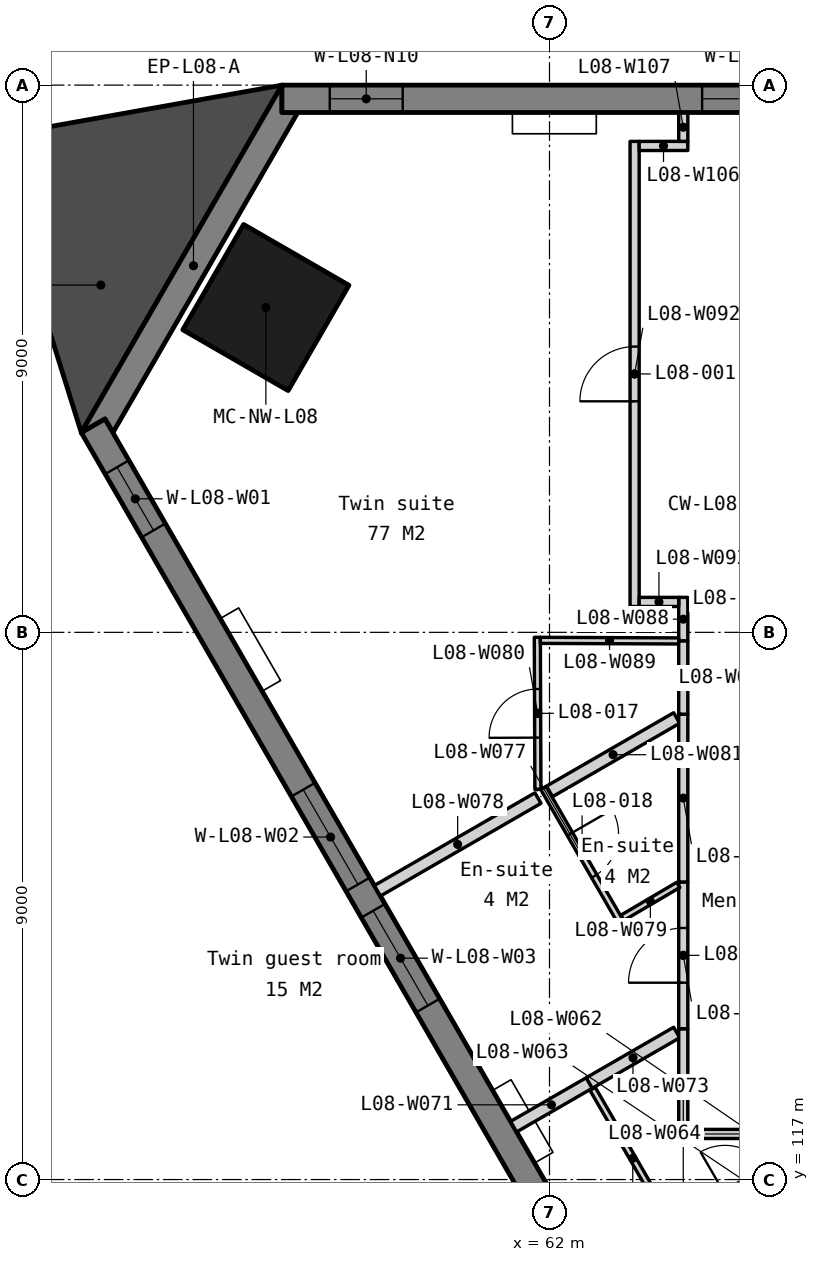
"""IFC4 building model, lengths in metres.
Left out: names, types, materials, properties, quantities, classifications, styles, units other than length and angle.
Written with IfcOpenShell. Run it as: python <this file> out.ifc"""

import sys

from ifc_helpers import new_model, si_unit, direction, frame, frame_2d, origin, origin_2d, place, context, subcontext, project, spatial, polyline, rectangle, outline, extrude, element, fill, save


model = new_model("IFC4")
c1 = context("Model", 3, precision=1e-05, world=origin(), true_north=direction((0.0, 1.0)))
c2 = subcontext(c1, "Body", "Model", "MODEL_VIEW")
j1 = project(units=[si_unit("LENGTHUNIT", "METRE"), si_unit("PLANEANGLEUNIT", "RADIAN")], contexts=[c1])
p1 = place(None, origin())
s1 = spatial("IfcSite", under=j1, at=p1, CompositionType="ELEMENT")
p2 = place(p1, origin())
s2 = spatial("IfcBuilding", under=s1, at=p2, CompositionType="ELEMENT")
p3 = place(p2, frame((0.0, 0.0, 42.0)))
s3 = spatial("IfcBuildingStorey", under=s2, at=p3, CompositionType="ELEMENT", Elevation=42.0)
p4 = place(p3, frame((57.336, 131.342, 0.0), z_axis=(0.0, 0.0, 1.0), x_axis=(-0.5, -0.866025403784, 0.0)))
e1 = element("IfcColumn", 1, at=p4, inside=s3, PredefinedType="COLUMN", context=c2, shape_type="SweptSolid", body=[
    extrude(rectangle(XDim=2.0, YDim=2.0, at=origin_2d()), origin(), (0.0, 0.0, 1.0), 3.5),
])
p5 = place(p3, frame((0.0, 0.0, -0.15)))
e2 = element("IfcWall", 2, at=p5, inside=s3, PredefinedType="SOLIDWALL", context=c2, shape_type="SweptSolid", body=[
    extrude(outline(polyline([(57.6, 135.0), (57.6, 134.55), (57.86, 134.55), (54.82, 129.284), (54.69, 129.509), (54.3, 129.284), (57.6, 135.0)])), origin(), (0.0, 0.0, 1.0), 3.5),
])
p6 = place(p3, frame((102.4, 134.775, -0.15), z_axis=(0.0, 0.0, 1.0), x_axis=(-1.0, 0.0, 0.0)))
e3 = element("IfcWall", 3, at=p6, inside=s3, PredefinedType="SOLIDWALL", context=c2, shape_type="SweptSolid", body=[
    extrude(outline(polyline([(44.8, 0.0), (44.8, 3.5), (0.0, 3.5), (0.0, 0.0), (44.8, 0.0)])), frame((0.0, 0.225, 0.0), z_axis=(0.0, -1.0, 0.0), x_axis=(1.0, 0.0, 0.0)), (0.0, 0.0, 1.0), 0.45),
])
p7 = place(p6, frame((0.786, 0.0, 1.05)))
e4 = element("IfcOpeningElement", 4, at=p7, cuts=e3, PredefinedType="OPENING", context=c2, shape_type="SweptSolid", body=[
    extrude(rectangle(XDim=1.2, YDim=1.5, at=frame_2d((0.6, 0.75))), frame((0.0, 0.235, 0.0), z_axis=(0.0, -1.0, 0.0), x_axis=(1.0, 0.0, 0.0)), (0.0, 0.0, 1.0), 0.47),
])
p8 = place(p6, frame((6.91, 0.0, 1.05)))
e5 = element("IfcOpeningElement", 5, at=p8, cuts=e3, PredefinedType="OPENING", context=c2, shape_type="SweptSolid", body=[
    extrude(rectangle(XDim=1.8, YDim=1.5, at=frame_2d((0.9, 0.75))), frame((0.0, 0.235, 0.0), z_axis=(0.0, -1.0, 0.0), x_axis=(1.0, 0.0, 0.0)), (0.0, 0.0, 1.0), 0.47),
])
p9 = place(p6, frame((9.21, 0.0, 1.05)))
e6 = element("IfcOpeningElement", 6, at=p9, cuts=e3, PredefinedType="OPENING", context=c2, shape_type="SweptSolid", body=[
    extrude(rectangle(XDim=1.8, YDim=1.5, at=frame_2d((0.9, 0.75))), frame((0.0, 0.235, 0.0), z_axis=(0.0, -1.0, 0.0), x_axis=(1.0, 0.0, 0.0)), (0.0, 0.0, 1.0), 0.47),
])
p10 = place(p6, frame((15.87, 0.0, 1.05)))
e7 = element("IfcOpeningElement", 7, at=p10, cuts=e3, PredefinedType="OPENING", context=c2, shape_type="SweptSolid", body=[
    extrude(rectangle(XDim=1.8, YDim=1.5, at=frame_2d((0.9, 0.75))), frame((0.0, 0.235, 0.0), z_axis=(0.0, -1.0, 0.0), x_axis=(1.0, 0.0, 0.0)), (0.0, 0.0, 1.0), 0.47),
])
p11 = place(p6, frame((18.17, 0.0, 1.05)))
e8 = element("IfcOpeningElement", 8, at=p11, cuts=e3, PredefinedType="OPENING", context=c2, shape_type="SweptSolid", body=[
    extrude(rectangle(XDim=1.8, YDim=1.5, at=frame_2d((0.9, 0.75))), frame((0.0, 0.235, 0.0), z_axis=(0.0, -1.0, 0.0), x_axis=(1.0, 0.0, 0.0)), (0.0, 0.0, 1.0), 0.47),
])
p12 = place(p6, frame((24.83, 0.0, 1.05)))
e9 = element("IfcOpeningElement", 9, at=p12, cuts=e3, PredefinedType="OPENING", context=c2, shape_type="SweptSolid", body=[
    extrude(rectangle(XDim=1.8, YDim=1.5, at=frame_2d((0.9, 0.75))), frame((0.0, 0.235, 0.0), z_axis=(0.0, -1.0, 0.0), x_axis=(1.0, 0.0, 0.0)), (0.0, 0.0, 1.0), 0.47),
])
p13 = place(p6, frame((27.13, 0.0, 1.05)))
e10 = element("IfcOpeningElement", 10, at=p13, cuts=e3, PredefinedType="OPENING", context=c2, shape_type="SweptSolid", body=[
    extrude(rectangle(XDim=1.8, YDim=1.5, at=frame_2d((0.9, 0.75))), frame((0.0, 0.235, 0.0), z_axis=(0.0, -1.0, 0.0), x_axis=(1.0, 0.0, 0.0)), (0.0, 0.0, 1.0), 0.47),
])
p14 = place(p6, frame((33.79, 0.0, 1.05)))
e11 = element("IfcOpeningElement", 11, at=p14, cuts=e3, PredefinedType="OPENING", context=c2, shape_type="SweptSolid", body=[
    extrude(rectangle(XDim=1.8, YDim=1.5, at=frame_2d((0.9, 0.75))), frame((0.0, 0.235, 0.0), z_axis=(0.0, -1.0, 0.0), x_axis=(1.0, 0.0, 0.0)), (0.0, 0.0, 1.0), 0.47),
])
p15 = place(p6, frame((36.09, 0.0, 1.05)))
e12 = element("IfcOpeningElement", 12, at=p15, cuts=e3, PredefinedType="OPENING", context=c2, shape_type="SweptSolid", body=[
    extrude(rectangle(XDim=1.8, YDim=1.5, at=frame_2d((0.9, 0.75))), frame((0.0, 0.235, 0.0), z_axis=(0.0, -1.0, 0.0), x_axis=(1.0, 0.0, 0.0)), (0.0, 0.0, 1.0), 0.47),
])
p16 = place(p6, frame((42.814, 0.0, 1.05)))
e13 = element("IfcOpeningElement", 13, at=p16, cuts=e3, PredefinedType="OPENING", context=c2, shape_type="SweptSolid", body=[
    extrude(rectangle(XDim=1.2, YDim=1.5, at=frame_2d((0.6, 0.75))), frame((0.0, 0.235, 0.0), z_axis=(0.0, -1.0, 0.0), x_axis=(1.0, 0.0, 0.0)), (0.0, 0.0, 1.0), 0.47),
])
p17 = place(p3, frame((54.495, 129.397, -0.15), z_axis=(0.0, 0.0, 1.0), x_axis=(0.499999201451, -0.866025864826, 0.0)))
e14 = element("IfcWall", 14, at=p17, inside=s3, PredefinedType="SOLIDWALL", context=c2, shape_type="SweptSolid", body=[
    extrude(outline(polyline([(44.8, 0.0), (44.8, 3.5), (0.0, 3.5), (0.0, 0.0), (44.8, 0.0)])), frame((0.0, 0.225, 0.0), z_axis=(0.0, -1.0, 0.0), x_axis=(1.0, 0.0, 0.0)), (0.0, 0.0, 1.0), 0.45),
])
p18 = place(p17, frame((0.786, 0.0, 1.05)))
e15 = element("IfcOpeningElement", 15, at=p18, cuts=e14, PredefinedType="OPENING", context=c2, shape_type="SweptSolid", body=[
    extrude(rectangle(XDim=1.2, YDim=1.5, at=frame_2d((0.6, 0.75))), frame((0.0, 0.235, 0.0), z_axis=(0.0, -1.0, 0.0), x_axis=(1.0, 0.0, 0.0)), (0.0, 0.0, 1.0), 0.47),
])
p19 = place(p17, frame((6.91, 0.0, 1.05)))
e16 = element("IfcOpeningElement", 16, at=p19, cuts=e14, PredefinedType="OPENING", context=c2, shape_type="SweptSolid", body=[
    extrude(rectangle(XDim=1.8, YDim=1.5, at=frame_2d((0.9, 0.75))), frame((0.0, 0.235, 0.0), z_axis=(0.0, -1.0, 0.0), x_axis=(1.0, 0.0, 0.0)), (0.0, 0.0, 1.0), 0.47),
])
p20 = place(p17, frame((9.21, 0.0, 1.05)))
e17 = element("IfcOpeningElement", 17, at=p20, cuts=e14, PredefinedType="OPENING", context=c2, shape_type="SweptSolid", body=[
    extrude(rectangle(XDim=1.8, YDim=1.5, at=frame_2d((0.9, 0.75))), frame((0.0, 0.235, 0.0), z_axis=(0.0, -1.0, 0.0), x_axis=(1.0, 0.0, 0.0)), (0.0, 0.0, 1.0), 0.47),
])
p21 = place(p17, frame((15.87, 0.0, 1.05)))
e18 = element("IfcOpeningElement", 18, at=p21, cuts=e14, PredefinedType="OPENING", context=c2, shape_type="SweptSolid", body=[
    extrude(rectangle(XDim=1.8, YDim=1.5, at=frame_2d((0.9, 0.75))), frame((0.0, 0.235, 0.0), z_axis=(0.0, -1.0, 0.0), x_axis=(1.0, 0.0, 0.0)), (0.0, 0.0, 1.0), 0.47),
])
p22 = place(p17, frame((18.17, 0.0, 1.05)))
e19 = element("IfcOpeningElement", 19, at=p22, cuts=e14, PredefinedType="OPENING", context=c2, shape_type="SweptSolid", body=[
    extrude(rectangle(XDim=1.8, YDim=1.5, at=frame_2d((0.9, 0.75))), frame((0.0, 0.235, 0.0), z_axis=(0.0, -1.0, 0.0), x_axis=(1.0, 0.0, 0.0)), (0.0, 0.0, 1.0), 0.47),
])
p23 = place(p17, frame((24.83, 0.0, 1.05)))
e20 = element("IfcOpeningElement", 20, at=p23, cuts=e14, PredefinedType="OPENING", context=c2, shape_type="SweptSolid", body=[
    extrude(rectangle(XDim=1.8, YDim=1.5, at=frame_2d((0.9, 0.75))), frame((0.0, 0.235, 0.0), z_axis=(0.0, -1.0, 0.0), x_axis=(1.0, 0.0, 0.0)), (0.0, 0.0, 1.0), 0.47),
])
p24 = place(p17, frame((27.13, 0.0, 1.05)))
e21 = element("IfcOpeningElement", 21, at=p24, cuts=e14, PredefinedType="OPENING", context=c2, shape_type="SweptSolid", body=[
    extrude(rectangle(XDim=1.8, YDim=1.5, at=frame_2d((0.9, 0.75))), frame((0.0, 0.235, 0.0), z_axis=(0.0, -1.0, 0.0), x_axis=(1.0, 0.0, 0.0)), (0.0, 0.0, 1.0), 0.47),
])
p25 = place(p17, frame((33.79, 0.0, 1.05)))
e22 = element("IfcOpeningElement", 22, at=p25, cuts=e14, PredefinedType="OPENING", context=c2, shape_type="SweptSolid", body=[
    extrude(rectangle(XDim=1.8, YDim=1.5, at=frame_2d((0.9, 0.75))), frame((0.0, 0.235, 0.0), z_axis=(0.0, -1.0, 0.0), x_axis=(1.0, 0.0, 0.0)), (0.0, 0.0, 1.0), 0.47),
])
p26 = place(p17, frame((36.09, 0.0, 1.05)))
e23 = element("IfcOpeningElement", 23, at=p26, cuts=e14, PredefinedType="OPENING", context=c2, shape_type="SweptSolid", body=[
    extrude(rectangle(XDim=1.8, YDim=1.5, at=frame_2d((0.9, 0.75))), frame((0.0, 0.235, 0.0), z_axis=(0.0, -1.0, 0.0), x_axis=(1.0, 0.0, 0.0)), (0.0, 0.0, 1.0), 0.47),
])
p27 = place(p17, frame((42.814, 0.0, 1.05)))
e24 = element("IfcOpeningElement", 24, at=p27, cuts=e14, PredefinedType="OPENING", context=c2, shape_type="SweptSolid", body=[
    extrude(rectangle(XDim=1.2, YDim=1.5, at=frame_2d((0.6, 0.75))), frame((0.0, 0.235, 0.0), z_axis=(0.0, -1.0, 0.0), x_axis=(1.0, 0.0, 0.0)), (0.0, 0.0, 1.0), 0.47),
])
p28 = place(p3, frame((0.0, 0.0, -0.15)))
e25 = element("IfcWall", 25, at=p28, inside=s3, PredefinedType="SOLIDWALL", context=c2, shape_type="SweptSolid", body=[
    extrude(outline(polyline([(57.6, 135.0), (52.782, 134.139), (54.3, 129.284), (57.6, 135.0)])), origin(), (0.0, 0.0, 1.0), 3.5),
])
p29 = place(p3, frame((62.709, 118.493, 0.0), z_axis=(0.0, 0.0, 1.0), x_axis=(0.500048002682, -0.865997687649, 0.0)))
e26 = element("IfcWall", 26, at=p29, inside=s3, PredefinedType="PARTITIONING", context=c2, shape_type="SweptSolid", body=[
    extrude(rectangle(XDim=2.64, YDim=0.1, at=frame_2d((1.32, 0.0))), origin(), (0.0, 0.0, 1.0), 3.35),
])
p30 = place(p3, frame((64.125, 117.75, 0.0), z_axis=(0.0, 0.0, 1.0), x_axis=(1.0, 0.0, 0.0)))
e27 = element("IfcWall", 27, at=p30, inside=s3, PredefinedType="PARTITIONING", context=c2, shape_type="SweptSolid", body=[
    extrude(rectangle(XDim=2.457, YDim=0.15, at=frame_2d((1.229, 0.0))), origin(), (0.0, 0.0, 1.0), 3.35),
])
p31 = place(p3, frame((64.056, 116.28, 0.0), z_axis=(0.0, 0.0, 1.0), x_axis=(0.864358276906, 0.50287649492, 0.0)))
e28 = element("IfcWall", 28, at=p31, inside=s3, PredefinedType="PARTITIONING", context=c2, shape_type="SweptSolid", body=[
    extrude(rectangle(XDim=2.718, YDim=0.1, at=frame_2d((1.359, 0.0))), origin(), (0.0, 0.0, 1.0), 3.35),
])
p32 = place(p31, frame((0.959, 0.0, 0.0)))
e29 = element("IfcOpeningElement", 29, at=p32, cuts=e28, PredefinedType="OPENING", context=c2, shape_type="SweptSolid", body=[
    extrude(rectangle(XDim=0.8, YDim=2.1, at=frame_2d((0.4, 1.05))), frame((0.0, 0.06, 0.0), z_axis=(0.0, -1.0, 0.0), x_axis=(1.0, 0.0, 0.0)), (0.0, 0.0, 1.0), 0.12),
])
p33 = place(p3, frame((61.41, 117.87, 0.0), z_axis=(0.0, 0.0, 1.0), x_axis=(0.866007328409, 0.500031306162, 0.0)))
e30 = element("IfcWall", 30, at=p33, inside=s3, PredefinedType="PARTITIONING", context=c2, shape_type="SweptSolid", body=[
    extrude(rectangle(XDim=1.437, YDim=0.2, at=frame_2d((0.719, 0.0))), origin(), (0.0, 0.0, 1.0), 3.35),
])
p34 = place(p3, frame((62.654, 118.588, 0.0), z_axis=(0.0, 0.0, 1.0), x_axis=(0.866090081402, 0.499887958344, 0.0)))
e31 = element("IfcWall", 31, at=p34, inside=s3, PredefinedType="PARTITIONING", context=c2, shape_type="SweptSolid", body=[
    extrude(rectangle(XDim=1.66, YDim=0.2, at=frame_2d((0.83, 0.0))), origin(), (0.0, 0.0, 1.0), 3.35),
])
p35 = place(p3, frame((64.2, 117.825, 0.0), z_axis=(0.0, 0.0, 1.0), x_axis=(0.0, 1.0, 0.0)))
e32 = element("IfcWall", 32, at=p35, inside=s3, PredefinedType="PARTITIONING", context=c2, shape_type="SweptSolid", body=[
    extrude(rectangle(XDim=1.656, YDim=0.15, at=frame_2d((0.828, 0.0))), origin(), (0.0, 0.0, 1.0), 3.35),
])
p36 = place(p3, frame((64.2, 119.481, 0.0), z_axis=(0.0, 0.0, 1.0), x_axis=(0.0, 1.0, 0.0)))
e33 = element("IfcWall", 33, at=p36, inside=s3, PredefinedType="PARTITIONING", context=c2, shape_type="SweptSolid", body=[
    extrude(rectangle(XDim=2.413, YDim=0.15, at=frame_2d((1.207, 0.0))), origin(), (0.0, 0.0, 1.0), 3.35),
])
p37 = place(p36, frame((0.757, 0.0, 0.0)))
e34 = element("IfcOpeningElement", 34, at=p37, cuts=e33, PredefinedType="OPENING", context=c2, shape_type="SweptSolid", body=[
    extrude(rectangle(XDim=0.9, YDim=2.1, at=frame_2d((0.45, 1.05))), frame((0.0, 0.085, 0.0), z_axis=(0.0, -1.0, 0.0), x_axis=(1.0, 0.0, 0.0)), (0.0, 0.0, 1.0), 0.17),
])
p38 = place(p3, frame((61.898, 123.44, 0.0), z_axis=(0.0, 0.0, 1.0), x_axis=(0.499990435942, -0.866030925526, 0.0)))
e35 = element("IfcWall", 35, at=p38, inside=s3, PredefinedType="PARTITIONING", context=c2, shape_type="SweptSolid", body=[
    extrude(rectangle(XDim=2.55, YDim=0.1, at=frame_2d((1.275, 0.0))), origin(), (0.0, 0.0, 1.0), 3.35),
])
p39 = place(p38, frame((0.875, 0.0, 0.0)))
e36 = element("IfcOpeningElement", 36, at=p39, cuts=e35, PredefinedType="OPENING", context=c2, shape_type="SweptSolid", body=[
    extrude(rectangle(XDim=0.8, YDim=2.1, at=frame_2d((0.4, 1.05))), frame((0.0, 0.06, 0.0), z_axis=(0.0, -1.0, 0.0), x_axis=(1.0, 0.0, 0.0)), (0.0, 0.0, 1.0), 0.12),
])
p40 = place(p3, frame((59.17, 121.75, 0.0), z_axis=(0.0, 0.0, 1.0), x_axis=(0.86606157367, 0.499937346687, 0.0)))
e37 = element("IfcWall", 37, at=p40, inside=s3, PredefinedType="PARTITIONING", context=c2, shape_type="SweptSolid", body=[
    extrude(rectangle(XDim=3.049, YDim=0.2, at=frame_2d((1.524, 0.0))), origin(), (0.0, 0.0, 1.0), 3.35),
])
p41 = place(p3, frame((63.2, 121.306, 0.0), z_axis=(0.0, 0.0, 1.0), x_axis=(0.86196956313, 0.506960030216, 0.0)))
e38 = element("IfcWall", 38, at=p41, inside=s3, PredefinedType="PARTITIONING", context=c2, shape_type="SweptSolid", body=[
    extrude(rectangle(XDim=1.065, YDim=0.1, at=frame_2d((0.533, 0.0))), origin(), (0.0, 0.0, 1.0), 3.35),
])
p42 = place(p3, frame((61.809, 123.418, 0.0), z_axis=(0.0, 0.0, 1.0), x_axis=(-0.003807822423, 0.999992750218, 0.0)))
e39 = element("IfcWall", 39, at=p42, inside=s3, PredefinedType="PARTITIONING", context=c2, shape_type="SweptSolid", body=[
    extrude(rectangle(XDim=2.5, YDim=0.1, at=frame_2d((1.25, 0.0))), origin(), (0.0, 0.0, 1.0), 3.35),
])
p43 = place(p42, frame((0.85, 0.0, 0.0)))
e40 = element("IfcOpeningElement", 40, at=p43, cuts=e39, PredefinedType="OPENING", context=c2, shape_type="SweptSolid", body=[
    extrude(rectangle(XDim=0.8, YDim=2.1, at=frame_2d((0.4, 1.05))), frame((0.0, 0.06, 0.0), z_axis=(0.0, -1.0, 0.0), x_axis=(1.0, 0.0, 0.0)), (0.0, 0.0, 1.0), 0.12),
])
p44 = place(p3, frame((62.0, 123.384, 0.0), z_axis=(0.0, 0.0, 1.0), x_axis=(0.866032396701, 0.499987887718, 0.0)))
e41 = element("IfcWall", 41, at=p44, inside=s3, PredefinedType="PARTITIONING", context=c2, shape_type="SweptSolid", body=[
    extrude(rectangle(XDim=2.415, YDim=0.2, at=frame_2d((1.208, 0.0))), origin(), (0.0, 0.0, 1.0), 3.35),
])
p45 = place(p3, frame((64.2, 121.894, 0.0), z_axis=(0.0, 0.0, 1.0), x_axis=(0.0, 1.0, 0.0)))
e42 = element("IfcWall", 42, at=p45, inside=s3, PredefinedType="PARTITIONING", context=c2, shape_type="SweptSolid", body=[
    extrude(rectangle(XDim=2.76, YDim=0.15, at=frame_2d((1.38, 0.0))), origin(), (0.0, 0.0, 1.0), 3.35),
])
p46 = place(p3, frame((64.2, 125.858, 0.0), z_axis=(0.0, 0.0, 1.0), x_axis=(0.0, 1.0, 0.0)))
e43 = element("IfcWall", 43, at=p46, inside=s3, PredefinedType="PARTITIONING", context=c2, shape_type="SweptSolid", body=[
    extrude(rectangle(XDim=0.717, YDim=0.15, at=frame_2d((0.358, 0.0))), origin(), (0.0, 0.0, 1.0), 3.35),
])
p47 = place(p3, frame((61.85, 125.868, 0.0), z_axis=(0.0, 0.0, 1.0), x_axis=(0.999991684538, -0.004078094442, 0.0)))
e44 = element("IfcWall", 44, at=p47, inside=s3, PredefinedType="PARTITIONING", context=c2, shape_type="SweptSolid", body=[
    extrude(rectangle(XDim=2.275, YDim=0.1, at=frame_2d((1.137, 0.0))), origin(), (0.0, 0.0, 1.0), 3.35),
])
p48 = place(p3, frame((64.2, 124.654, 0.0), z_axis=(0.0, 0.0, 1.0), x_axis=(0.0, 1.0, 0.0)))
e45 = element("IfcWall", 45, at=p48, inside=s3, PredefinedType="PARTITIONING", context=c2, shape_type="SweptSolid", body=[
    extrude(rectangle(XDim=1.204, YDim=0.15, at=frame_2d((0.602, 0.0))), origin(), (0.0, 0.0, 1.0), 3.35),
])
p49 = place(p3, frame((63.4, 126.425, 0.0), z_axis=(0.0, 0.0, 1.0), x_axis=(0.0, 1.0, 0.0)))
e46 = element("IfcWall", 46, at=p49, inside=s3, PredefinedType="PARTITIONING", context=c2, shape_type="SweptSolid", body=[
    extrude(rectangle(XDim=7.649, YDim=0.15, at=frame_2d((3.825, 0.0))), origin(), (0.0, 0.0, 1.0), 3.35),
])
p50 = place(p49, frame((3.375, 0.0, 0.0)))
e47 = element("IfcOpeningElement", 47, at=p50, cuts=e46, PredefinedType="OPENING", context=c2, shape_type="SweptSolid", body=[
    extrude(rectangle(XDim=0.9, YDim=2.1, at=frame_2d((0.45, 1.05))), frame((0.0, 0.085, 0.0), z_axis=(0.0, -1.0, 0.0), x_axis=(1.0, 0.0, 0.0)), (0.0, 0.0, 1.0), 0.17),
])
p51 = place(p3, frame((63.475, 126.5, 0.0), z_axis=(0.0, 0.0, 1.0), x_axis=(1.0, 0.0, 0.0)))
e48 = element("IfcWall", 48, at=p51, inside=s3, PredefinedType="PARTITIONING", context=c2, shape_type="SweptSolid", body=[
    extrude(rectangle(XDim=0.65, YDim=0.15, at=frame_2d((0.325, 0.0))), origin(), (0.0, 0.0, 1.0), 3.35),
])
p52 = place(p3, frame((63.475, 134.0, 0.0), z_axis=(0.0, 0.0, 1.0), x_axis=(0.999999813645, 0.000610500497, 0.0)))
e49 = element("IfcWall", 49, at=p52, inside=s3, PredefinedType="PARTITIONING", context=c2, shape_type="SweptSolid", body=[
    extrude(rectangle(XDim=0.8, YDim=0.15, at=frame_2d((0.4, 0.0))), origin(), (0.0, 0.0, 1.0), 2.887),
])
p53 = place(p3, frame((64.2, 134.075, 0.0), z_axis=(0.0, 0.0, 1.0), x_axis=(0.0, 1.0, 0.0)))
e50 = element("IfcWall", 50, at=p53, inside=s3, PredefinedType="PARTITIONING", context=c2, shape_type="SweptSolid", body=[
    extrude(rectangle(XDim=0.465, YDim=0.15, at=frame_2d((0.232, 0.0))), origin(), (0.0, 0.0, 1.0), 2.887),
])
p54 = place(p15, origin())
e51 = element("IfcWindow", 51, at=p54, inside=s3, PartitioningType="SINGLE_PANEL", PredefinedType="WINDOW", context=c2, shape_type="SweptSolid", body=[
    extrude(rectangle(XDim=1.8, YDim=1.5, at=frame_2d((0.9, 0.75))), frame((0.0, 0.03, 0.0), z_axis=(0.0, -1.0, 0.0), x_axis=(1.0, 0.0, 0.0)), (0.0, 0.0, 1.0), 0.06),
])
fill(e12, e51)
p55 = place(p16, origin())
e52 = element("IfcWindow", 52, at=p55, inside=s3, PartitioningType="SINGLE_PANEL", PredefinedType="WINDOW", context=c2, shape_type="SweptSolid", body=[
    extrude(rectangle(XDim=1.2, YDim=1.5, at=frame_2d((0.6, 0.75))), frame((0.0, 0.03, 0.0), z_axis=(0.0, -1.0, 0.0), x_axis=(1.0, 0.0, 0.0)), (0.0, 0.0, 1.0), 0.06),
])
fill(e13, e52)
p56 = place(p18, origin())
e53 = element("IfcWindow", 53, at=p56, inside=s3, PartitioningType="SINGLE_PANEL", PredefinedType="WINDOW", context=c2, shape_type="SweptSolid", body=[
    extrude(rectangle(XDim=1.2, YDim=1.5, at=frame_2d((0.6, 0.75))), frame((0.0, 0.03, 0.0), z_axis=(0.0, -1.0, 0.0), x_axis=(1.0, 0.0, 0.0)), (0.0, 0.0, 1.0), 0.06),
])
fill(e15, e53)
p57 = place(p19, origin())
e54 = element("IfcWindow", 54, at=p57, inside=s3, PartitioningType="SINGLE_PANEL", PredefinedType="WINDOW", context=c2, shape_type="SweptSolid", body=[
    extrude(rectangle(XDim=1.8, YDim=1.5, at=frame_2d((0.9, 0.75))), frame((0.0, 0.03, 0.0), z_axis=(0.0, -1.0, 0.0), x_axis=(1.0, 0.0, 0.0)), (0.0, 0.0, 1.0), 0.06),
])
fill(e16, e54)
p58 = place(p20, origin())
e55 = element("IfcWindow", 55, at=p58, inside=s3, PartitioningType="SINGLE_PANEL", PredefinedType="WINDOW", context=c2, shape_type="SweptSolid", body=[
    extrude(rectangle(XDim=1.8, YDim=1.5, at=frame_2d((0.9, 0.75))), frame((0.0, 0.03, 0.0), z_axis=(0.0, -1.0, 0.0), x_axis=(1.0, 0.0, 0.0)), (0.0, 0.0, 1.0), 0.06),
])
fill(e17, e55)
p59 = place(p50, origin())
e56 = element("IfcDoor", 56, at=p59, inside=s3, OperationType="SINGLE_SWING_LEFT", PredefinedType="DOOR", context=c2, shape_type="SweptSolid", body=[
    extrude(rectangle(XDim=0.9, YDim=2.1, at=frame_2d((0.45, 1.05))), frame((0.0, 0.025, 0.0), z_axis=(0.0, -1.0, 0.0), x_axis=(1.0, 0.0, 0.0)), (0.0, 0.0, 1.0), 0.05),
])
fill(e47, e56)
p60 = place(p37, origin())
e57 = element("IfcDoor", 57, at=p60, inside=s3, OperationType="SINGLE_SWING_LEFT", PredefinedType="DOOR", context=c2, shape_type="SweptSolid", body=[
    extrude(rectangle(XDim=0.9, YDim=2.1, at=frame_2d((0.45, 1.05))), frame((0.0, 0.025, 0.0), z_axis=(0.0, -1.0, 0.0), x_axis=(1.0, 0.0, 0.0)), (0.0, 0.0, 1.0), 0.05),
])
fill(e34, e57)
p61 = place(p43, origin())
e58 = element("IfcDoor", 58, at=p61, inside=s3, OperationType="SINGLE_SWING_LEFT", PredefinedType="DOOR", context=c2, shape_type="SweptSolid", body=[
    extrude(rectangle(XDim=0.8, YDim=2.1, at=frame_2d((0.4, 1.05))), frame((0.0, 0.025, 0.0), z_axis=(0.0, -1.0, 0.0), x_axis=(1.0, 0.0, 0.0)), (0.0, 0.0, 1.0), 0.05),
])
fill(e40, e58)
p62 = place(p39, origin())
e59 = element("IfcDoor", 59, at=p62, inside=s3, OperationType="SINGLE_SWING_LEFT", PredefinedType="DOOR", context=c2, shape_type="SweptSolid", body=[
    extrude(rectangle(XDim=0.8, YDim=2.1, at=frame_2d((0.4, 1.05))), frame((0.0, 0.025, 0.0), z_axis=(0.0, -1.0, 0.0), x_axis=(1.0, 0.0, 0.0)), (0.0, 0.0, 1.0), 0.05),
])
fill(e36, e59)
p63 = place(p32, origin())
e60 = element("IfcDoor", 60, at=p63, inside=s3, OperationType="SINGLE_SWING_LEFT", PredefinedType="DOOR", context=c2, shape_type="SweptSolid", body=[
    extrude(rectangle(XDim=0.8, YDim=2.1, at=frame_2d((0.4, 1.05))), frame((0.0, 0.025, 0.0), z_axis=(0.0, -1.0, 0.0), x_axis=(1.0, 0.0, 0.0)), (0.0, 0.0, 1.0), 0.05),
])
fill(e29, e60)
save(model, sys.argv[1])
